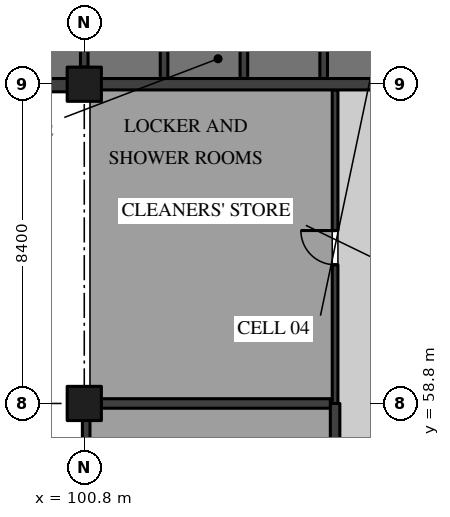
"""IFC4 building model, lengths in metres.
Left out: names, types, materials, properties, quantities, classifications, styles, units other than length and angle.
Written with IfcOpenShell. Run it as: python <this file> out.ifc"""

import sys

from ifc_helpers import new_model, si_unit, direction, frame, frame_2d, origin, origin_2d, place, context, subcontext, project, spatial, rectangle, extrude, element, fill, save


model = new_model("IFC4")
c1 = context("Model", 3, precision=1e-05, world=origin(), true_north=direction((0.0, 1.0)))
c2 = subcontext(c1, "Body", "Model", "MODEL_VIEW")
j1 = project(units=[si_unit("LENGTHUNIT", "METRE"), si_unit("PLANEANGLEUNIT", "RADIAN")], contexts=[c1])
p1 = place(None, origin())
s1 = spatial("IfcSite", under=j1, at=p1, CompositionType="ELEMENT")
p2 = place(p1, origin())
s2 = spatial("IfcBuilding", under=s1, at=p2, CompositionType="ELEMENT")
p3 = place(p2, origin())
s3 = spatial("IfcBuildingStorey", under=s2, at=p3, CompositionType="ELEMENT", Elevation=0.0)
for number, where, z_axis, x_axis in (
    (1, (100.8, 58.8, 0.0), (0.0, 0.0, 1.0), (1.0, 0.0, 0.0)),
    (2, (100.8, 67.2, 0.0), (0.0, 0.0, 1.0), (1.0, 0.0, 0.0)),
):
    element("IfcColumn", number, at=place(p3, frame(where, z_axis=z_axis, x_axis=x_axis)), inside=s3, PredefinedType="COLUMN", context=c2, shape_type="SweptSolid", body=[
        extrude(rectangle(XDim=0.9, YDim=0.9, at=origin_2d()), origin(), (0.0, 0.0, 1.0), 5.05),
    ])
p4 = place(p3, frame((107.4, 54.6, 0.0), z_axis=(0.0, 0.0, 1.0), x_axis=(0.0, 1.0, 0.0)))
e3 = element("IfcWall", 3, at=p4, inside=s3, PredefinedType="PARTITIONING", context=c2, shape_type="SweptSolid", body=[
    extrude(rectangle(XDim=4.2, YDim=0.25, at=frame_2d((2.1, 0.0))), origin(), (0.0, 0.0, 1.0), 5.05),
])
p5 = place(p4, frame((1.6, 0.0, 0.0)))
e4 = element("IfcOpeningElement", 4, at=p5, cuts=e3, PredefinedType="OPENING", context=c2, shape_type="SweptSolid", body=[
    extrude(rectangle(XDim=1.0, YDim=2.1, at=frame_2d((0.5, 1.05))), frame((0.0, 0.135, 0.0), z_axis=(0.0, -1.0, 0.0), x_axis=(1.0, 0.0, 0.0)), (0.0, 0.0, 1.0), 0.27),
])
p6 = place(p3, frame((107.4, 58.8, 0.0), z_axis=(0.0, 0.0, 1.0), x_axis=(0.0, 1.0, 0.0)))
e5 = element("IfcWall", 5, at=p6, inside=s3, PredefinedType="PARTITIONING", context=c2, shape_type="SweptSolid", body=[
    extrude(rectangle(XDim=8.25, YDim=0.15, at=frame_2d((4.125, 0.0))), origin(), (0.0, 0.0, 1.0), 5.05),
])
p7 = place(p6, frame((3.65, 0.0, 0.0)))
e6 = element("IfcOpeningElement", 6, at=p7, cuts=e5, PredefinedType="OPENING", context=c2, shape_type="SweptSolid", body=[
    extrude(rectangle(XDim=0.9, YDim=2.1, at=frame_2d((0.45, 1.05))), frame((0.0, 0.085, 0.0), z_axis=(0.0, -1.0, 0.0), x_axis=(1.0, 0.0, 0.0)), (0.0, 0.0, 1.0), 0.17),
])
p8 = place(p3, frame((101.25, 58.8, 0.0), z_axis=(0.0, 0.0, 1.0), x_axis=(1.0, 0.0, 0.0)))
e7 = element("IfcWall", 7, at=p8, inside=s3, PredefinedType="PARTITIONING", context=c2, shape_type="SweptSolid", body=[
    extrude(rectangle(XDim=6.025, YDim=0.25, at=frame_2d((3.012, 0.0))), origin(), (0.0, 0.0, 1.0), 5.05),
])
p9 = place(p3, frame((102.9, 67.35, 0.0), z_axis=(0.0, 0.0, 1.0), x_axis=(0.0, 1.0, 0.0)))
e8 = element("IfcWall", 8, at=p9, inside=s3, PredefinedType="PARTITIONING", context=c2, shape_type="SweptSolid", body=[
    extrude(rectangle(XDim=3.05, YDim=0.2, at=frame_2d((1.525, 0.0))), origin(), (0.0, 0.0, 1.0), 5.05),
])
p10 = place(p3, frame((100.8, 67.65, 0.0), z_axis=(0.0, 0.0, 1.0), x_axis=(0.0, 1.0, 0.0)))
e9 = element("IfcWall", 9, at=p10, inside=s3, PredefinedType="PARTITIONING", context=c2, shape_type="SweptSolid", body=[
    extrude(rectangle(XDim=2.75, YDim=0.2, at=frame_2d((1.375, 0.0))), origin(), (0.0, 0.0, 1.0), 5.05),
])
for number, where, z_axis, x_axis in (
    (10, (105.0, 67.35, 0.0), (0.0, 0.0, 1.0), (0.0, 1.0, 0.0)),
    (11, (107.1, 67.35, 0.0), (0.0, 0.0, 1.0), (0.0, 1.0, 0.0)),
):
    element("IfcWall", number, at=place(p3, frame(where, z_axis=z_axis, x_axis=x_axis)), inside=s3, PredefinedType="PARTITIONING", context=c2, shape_type="SweptSolid", body=[
        extrude(rectangle(XDim=3.05, YDim=0.2, at=frame_2d((1.525, 0.0))), origin(), (0.0, 0.0, 1.0), 5.05),
    ])
p11 = place(p3, frame((92.6, 67.175, 0.0), z_axis=(0.0, 0.0, 1.0), x_axis=(1.0, 0.0, 0.0)))
e12 = element("IfcWall", 12, at=p11, inside=s3, PredefinedType="SOLIDWALL", context=c2, shape_type="SweptSolid", body=[
    extrude(rectangle(XDim=7.77, YDim=0.35, at=frame_2d((3.885, 0.0))), origin(), (0.0, 0.0, 1.0), 5.05),
])
p12 = place(p11, frame((0.4, 0.0, 1.5)))
e13 = element("IfcOpeningElement", 13, at=p12, cuts=e12, PredefinedType="OPENING", context=c2, shape_type="SweptSolid", body=[
    extrude(rectangle(XDim=0.9, YDim=1.2, at=frame_2d((0.45, 0.6))), frame((0.0, 0.185, 0.0), z_axis=(0.0, -1.0, 0.0), x_axis=(1.0, 0.0, 0.0)), (0.0, 0.0, 1.0), 0.37),
])
p13 = place(p11, frame((2.5, 0.0, 1.5)))
e14 = element("IfcOpeningElement", 14, at=p13, cuts=e12, PredefinedType="OPENING", context=c2, shape_type="SweptSolid", body=[
    extrude(rectangle(XDim=0.9, YDim=1.2, at=frame_2d((0.45, 0.6))), frame((0.0, 0.185, 0.0), z_axis=(0.0, -1.0, 0.0), x_axis=(1.0, 0.0, 0.0)), (0.0, 0.0, 1.0), 0.37),
])
p14 = place(p11, frame((4.6, 0.0, 1.5)))
e15 = element("IfcOpeningElement", 15, at=p14, cuts=e12, PredefinedType="OPENING", context=c2, shape_type="SweptSolid", body=[
    extrude(rectangle(XDim=0.9, YDim=1.2, at=frame_2d((0.45, 0.6))), frame((0.0, 0.185, 0.0), z_axis=(0.0, -1.0, 0.0), x_axis=(1.0, 0.0, 0.0)), (0.0, 0.0, 1.0), 0.37),
])
p15 = place(p3, frame((100.85, 58.37, 0.0), z_axis=(0.0, 0.0, 1.0), x_axis=(0.0, -1.0, 0.0)))
e16 = element("IfcWall", 16, at=p15, inside=s3, PredefinedType="SOLIDWALL", context=c2, shape_type="SweptSolid", body=[
    extrude(rectangle(XDim=3.07, YDim=0.2, at=frame_2d((1.535, 0.0))), origin(), (0.0, 0.0, 1.0), 5.05),
])
p16 = place(p15, frame((1.17, 0.0, 0.0)))
e17 = element("IfcOpeningElement", 17, at=p16, cuts=e16, PredefinedType="OPENING", context=c2, shape_type="SweptSolid", body=[
    extrude(rectangle(XDim=1.0, YDim=2.4, at=frame_2d((0.5, 1.2))), frame((0.0, 0.11, 0.0), z_axis=(0.0, -1.0, 0.0), x_axis=(1.0, 0.0, 0.0)), (0.0, 0.0, 1.0), 0.22),
])
p17 = place(p3, frame((109.0, 67.2, 0.0), z_axis=(0.0, 0.0, 1.0), x_axis=(-1.0, 0.0, 0.0)))
e18 = element("IfcWall", 18, at=p17, inside=s3, PredefinedType="SOLIDWALL", context=c2, shape_type="SweptSolid", body=[
    extrude(rectangle(XDim=7.77, YDim=0.3, at=frame_2d((3.885, 0.0))), origin(), (0.0, 0.0, 1.0), 5.05),
])
p18 = place(p7, origin())
e19 = element("IfcDoor", 19, at=p18, inside=s3, OperationType="SINGLE_SWING_LEFT", PredefinedType="DOOR", context=c2, shape_type="SweptSolid", body=[
    extrude(rectangle(XDim=0.9, YDim=2.1, at=frame_2d((0.45, 1.05))), frame((0.0, 0.025, 0.0), z_axis=(0.0, -1.0, 0.0), x_axis=(1.0, 0.0, 0.0)), (0.0, 0.0, 1.0), 0.05),
])
fill(e6, e19)
save(model, sys.argv[1])
